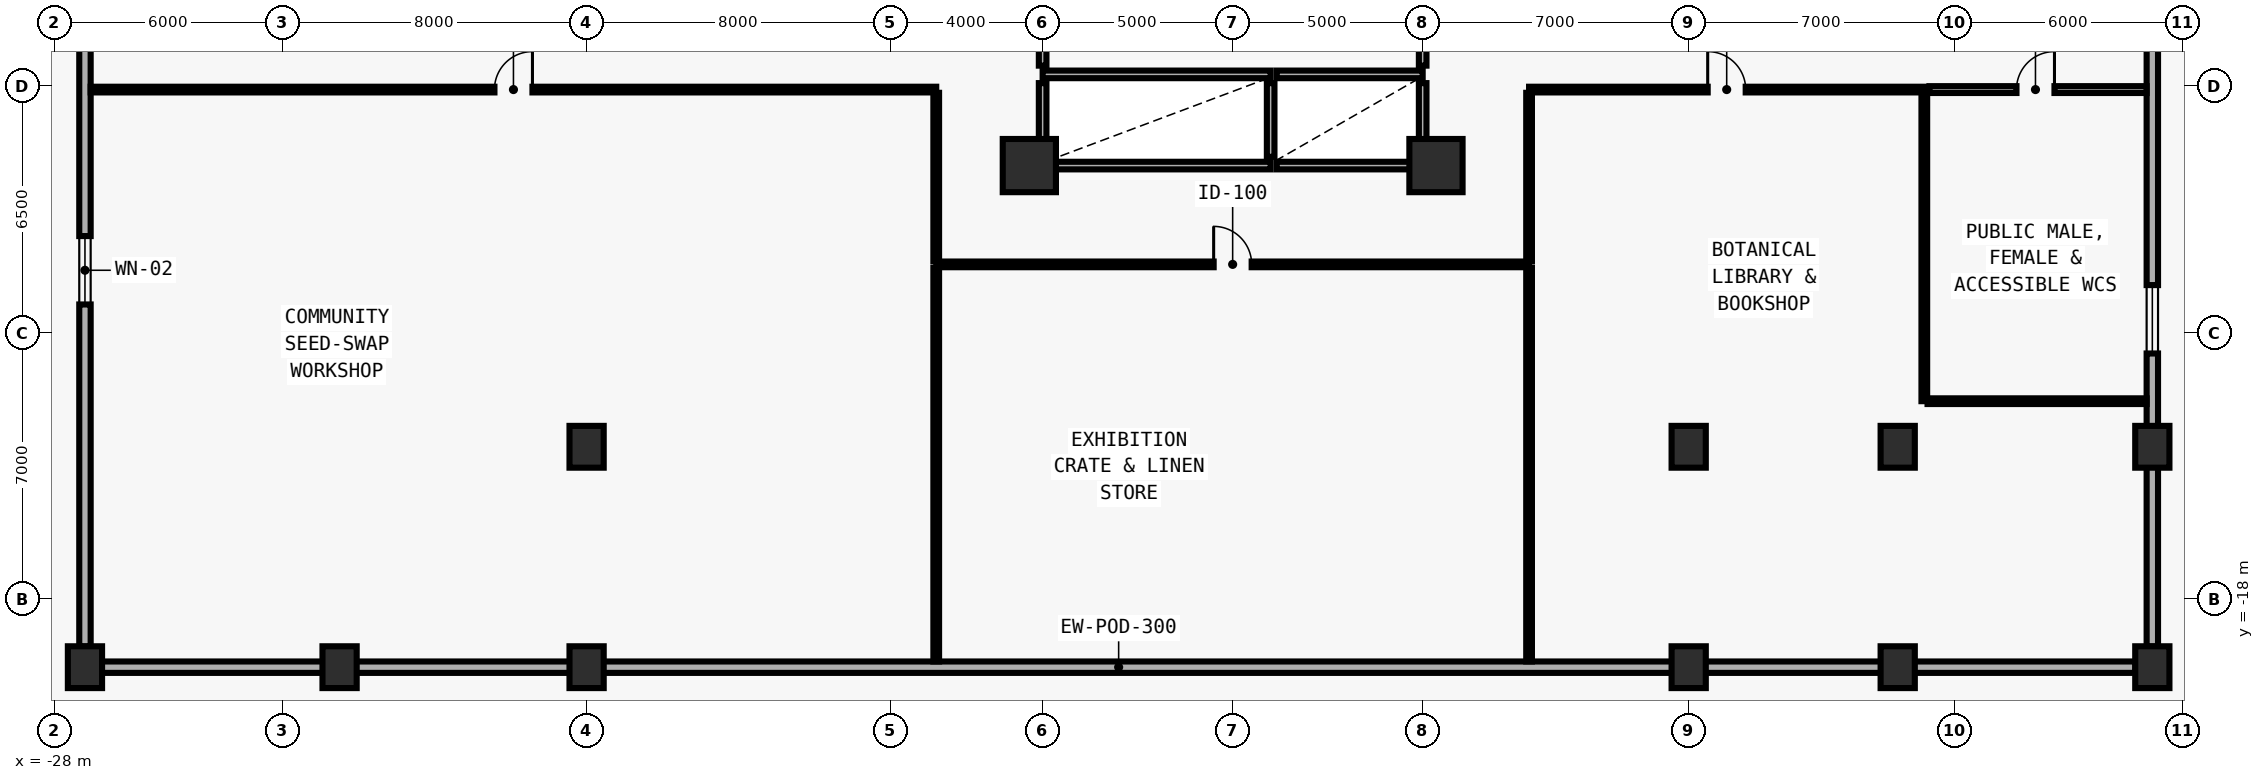
"""IFC4 building model, lengths in metres.
Left out: names, types, materials, properties, quantities, classifications, styles, units other than length and angle.
Written with IfcOpenShell. Run it as: python <this file> out.ifc"""

import sys

from ifc_helpers import new_model, si_unit, direction, frame, frame_2d, origin, origin_2d, place, context, subcontext, project, spatial, rectangle, extrude, element, fill, save


model = new_model("IFC4")
c1 = context("Model", 3, precision=1e-05, world=origin(), true_north=direction((0.0, 1.0)))
c2 = subcontext(c1, "Body", "Model", "MODEL_VIEW")
j1 = project(units=[si_unit("LENGTHUNIT", "METRE"), si_unit("PLANEANGLEUNIT", "RADIAN")], contexts=[c1])
p1 = place(None, origin())
s1 = spatial("IfcSite", under=j1, at=p1, CompositionType="ELEMENT")
p2 = place(p1, origin())
s2 = spatial("IfcBuilding", under=s1, at=p2, CompositionType="ELEMENT")
p3 = place(p2, frame((0.0, 0.0, 13.8)))
s3 = spatial("IfcBuildingStorey", under=s2, at=p3, CompositionType="ELEMENT", Elevation=13.8)
for number, where, z_axis, x_axis in (
    (1, (-2.35, -6.6, 0.0), (0.0, 0.0, 1.0), (1.0, 0.0, 0.0)),
    (2, (8.35, -6.6, 0.0), (0.0, 0.0, 1.0), (1.0, 0.0, 0.0)),
):
    element("IfcColumn", number, at=place(p3, frame(where, z_axis=z_axis, x_axis=x_axis)), inside=s3, PredefinedType="COLUMN", context=c2, shape_type="SweptSolid", body=[
        extrude(rectangle(XDim=1.4, YDim=1.4, at=origin_2d()), origin(), (0.0, 0.0, 1.0), 4.575),
    ])
for number, where, z_axis, x_axis in (
    (3, (-27.2, -19.8, 0.0), (0.0, 0.0, 1.0), (1.0, 0.0, 0.0)),
    (4, (-20.5, -19.8, 0.0), (0.0, 0.0, 1.0), (1.0, 0.0, 0.0)),
    (5, (-14.0, -19.8, 0.0), (0.0, 0.0, 1.0), (1.0, 0.0, 0.0)),
    (6, (-14.0, -14.0, 0.0), (0.0, 0.0, 1.0), (1.0, 0.0, 0.0)),
    (7, (15.0, -19.8, 0.0), (0.0, 0.0, 1.0), (1.0, 0.0, 0.0)),
    (8, (15.0, -14.0, 0.0), (0.0, 0.0, 1.0), (1.0, 0.0, 0.0)),
    (9, (20.5, -19.8, 0.0), (0.0, 0.0, 1.0), (1.0, 0.0, 0.0)),
    (10, (20.5, -14.0, 0.0), (0.0, 0.0, 1.0), (1.0, 0.0, 0.0)),
    (11, (27.2, -19.8, 0.0), (0.0, 0.0, 1.0), (1.0, 0.0, 0.0)),
    (12, (27.2, -14.0, 0.0), (0.0, 0.0, 1.0), (1.0, 0.0, 0.0)),
):
    element("IfcColumn", number, at=place(p3, frame(where, z_axis=z_axis, x_axis=x_axis)), inside=s3, PredefinedType="COLUMN", context=c2, shape_type="SweptSolid", body=[
        extrude(rectangle(XDim=0.9, YDim=1.1, at=origin_2d()), origin(), (0.0, 0.0, 1.0), 4.575),
    ])
p4 = place(p3, frame((-27.2, -19.255, 0.0), z_axis=(0.0, 0.0, 1.0), x_axis=(0.0, 1.0, 0.0)))
e13 = element("IfcWall", 13, at=p4, inside=s3, PredefinedType="SOLIDWALL", context=c2, shape_type="SweptSolid", body=[
    extrude(rectangle(XDim=38.51, YDim=0.3, at=frame_2d((19.255, 0.0))), origin(), (0.0, 0.0, 1.0), 3.35),
])
p5 = place(p4, frame((9.0, 0.0, 0.85)))
e14 = element("IfcOpeningElement", 14, at=p5, cuts=e13, PredefinedType="OPENING", context=c2, shape_type="SweptSolid", body=[
    extrude(rectangle(XDim=1.8, YDim=1.9, at=frame_2d((0.9, 0.95))), frame((0.0, 0.16, 0.0), z_axis=(0.0, -1.0, 0.0), x_axis=(1.0, 0.0, 0.0)), (0.0, 0.0, 1.0), 0.32),
])
p6 = place(p4, frame((16.0, 0.0, 0.85)))
e15 = element("IfcOpeningElement", 15, at=p6, cuts=e13, PredefinedType="OPENING", context=c2, shape_type="SweptSolid", body=[
    extrude(rectangle(XDim=1.8, YDim=1.9, at=frame_2d((0.9, 0.95))), frame((0.0, 0.16, 0.0), z_axis=(0.0, -1.0, 0.0), x_axis=(1.0, 0.0, 0.0)), (0.0, 0.0, 1.0), 0.32),
])
p7 = place(p4, frame((29.0, 0.0, 0.85)))
e16 = element("IfcOpeningElement", 16, at=p7, cuts=e13, PredefinedType="OPENING", context=c2, shape_type="SweptSolid", body=[
    extrude(rectangle(XDim=1.8, YDim=1.9, at=frame_2d((0.9, 0.95))), frame((0.0, 0.16, 0.0), z_axis=(0.0, -1.0, 0.0), x_axis=(1.0, 0.0, 0.0)), (0.0, 0.0, 1.0), 0.32),
])
p8 = place(p3, frame((27.2, 19.255, 0.0), z_axis=(0.0, 0.0, 1.0), x_axis=(0.0, -1.0, 0.0)))
e17 = element("IfcWall", 17, at=p8, inside=s3, PredefinedType="SOLIDWALL", context=c2, shape_type="SweptSolid", body=[
    extrude(rectangle(XDim=38.51, YDim=0.3, at=frame_2d((19.255, 0.0))), origin(), (0.0, 0.0, 1.0), 3.35),
])
p9 = place(p8, frame((9.0, 0.0, 0.85)))
e18 = element("IfcOpeningElement", 18, at=p9, cuts=e17, PredefinedType="OPENING", context=c2, shape_type="SweptSolid", body=[
    extrude(rectangle(XDim=1.8, YDim=1.9, at=frame_2d((0.9, 0.95))), frame((0.0, 0.16, 0.0), z_axis=(0.0, -1.0, 0.0), x_axis=(1.0, 0.0, 0.0)), (0.0, 0.0, 1.0), 0.32),
])
p10 = place(p8, frame((29.0, 0.0, 0.85)))
e19 = element("IfcOpeningElement", 19, at=p10, cuts=e17, PredefinedType="OPENING", context=c2, shape_type="SweptSolid", body=[
    extrude(rectangle(XDim=1.8, YDim=1.9, at=frame_2d((0.9, 0.95))), frame((0.0, 0.16, 0.0), z_axis=(0.0, -1.0, 0.0), x_axis=(1.0, 0.0, 0.0)), (0.0, 0.0, 1.0), 0.32),
])
p11 = place(p3, frame((26.755, -19.8, 0.0), z_axis=(0.0, 0.0, 1.0), x_axis=(-1.0, 0.0, 0.0)))
e20 = element("IfcWall", 20, at=p11, inside=s3, PredefinedType="SOLIDWALL", context=c2, shape_type="SweptSolid", body=[
    extrude(rectangle(XDim=53.51, YDim=0.3, at=frame_2d((26.755, 0.0))), origin(), (0.0, 0.0, 1.0), 3.35),
])
p12 = place(p3, frame((-2.0, -4.2, 0.0), z_axis=(0.0, 0.0, 1.0), x_axis=(1.0, 0.0, 0.0)))
e21 = element("IfcWall", 21, at=p12, inside=s3, PredefinedType="SOLIDWALL", context=c2, shape_type="SweptSolid", body=[
    extrude(rectangle(XDim=6.0, YDim=0.2, at=frame_2d((3.0, 0.0))), origin(), (0.0, 0.0, 1.0), 4.28),
])
p13 = place(p3, frame((-2.0, -6.6, 0.0), z_axis=(0.0, 0.0, 1.0), x_axis=(1.0, 0.0, 0.0)))
e22 = element("IfcWall", 22, at=p13, inside=s3, PredefinedType="SOLIDWALL", context=c2, shape_type="SweptSolid", body=[
    extrude(rectangle(XDim=6.0, YDim=0.2, at=frame_2d((3.0, 0.0))), origin(), (0.0, 0.0, 1.0), 3.362),
])
p14 = place(p3, frame((-2.0, -6.37, 0.0), z_axis=(0.0, 0.0, 1.0), x_axis=(0.0, 1.0, 0.0)))
e23 = element("IfcWall", 23, at=p14, inside=s3, PredefinedType="SOLIDWALL", context=c2, shape_type="SweptSolid", body=[
    extrude(rectangle(XDim=1.94, YDim=0.2, at=frame_2d((0.97, 0.0))), origin(), (0.0, 0.0, 1.0), 3.362),
])
p15 = place(p3, frame((4.16, -4.2, 0.0), z_axis=(0.0, 0.0, 1.0), x_axis=(1.0, 0.0, 0.0)))
e24 = element("IfcWall", 24, at=p15, inside=s3, PredefinedType="SOLIDWALL", context=c2, shape_type="SweptSolid", body=[
    extrude(rectangle(XDim=3.84, YDim=0.2, at=frame_2d((1.92, 0.0))), origin(), (0.0, 0.0, 1.0), 4.28),
])
p16 = place(p3, frame((4.16, -6.6, 0.0), z_axis=(0.0, 0.0, 1.0), x_axis=(1.0, 0.0, 0.0)))
e25 = element("IfcWall", 25, at=p16, inside=s3, PredefinedType="SOLIDWALL", context=c2, shape_type="SweptSolid", body=[
    extrude(rectangle(XDim=3.84, YDim=0.2, at=frame_2d((1.92, 0.0))), origin(), (0.0, 0.0, 1.0), 3.362),
])
p17 = place(p3, frame((4.0, -6.37, 0.0), z_axis=(0.0, 0.0, 1.0), x_axis=(0.0, 1.0, 0.0)))
e26 = element("IfcWall", 26, at=p17, inside=s3, PredefinedType="SOLIDWALL", context=c2, shape_type="SweptSolid", body=[
    extrude(rectangle(XDim=1.94, YDim=0.2, at=frame_2d((0.97, 0.0))), origin(), (0.0, 0.0, 1.0), 4.28),
])
p18 = place(p3, frame((8.0, -6.37, 0.0), z_axis=(0.0, 0.0, 1.0), x_axis=(0.0, 1.0, 0.0)))
e27 = element("IfcWall", 27, at=p18, inside=s3, PredefinedType="SOLIDWALL", context=c2, shape_type="SweptSolid", body=[
    extrude(rectangle(XDim=1.94, YDim=0.2, at=frame_2d((0.97, 0.0))), origin(), (0.0, 0.0, 1.0), 3.362),
])
p19 = place(p3, frame((-2.0, -3.97, 0.0), z_axis=(0.0, 0.0, 1.0), x_axis=(0.0, 1.0, 0.0)))
e28 = element("IfcWall", 28, at=p19, inside=s3, PredefinedType="MOVABLE", context=c2, shape_type="SweptSolid", body=[
    extrude(rectangle(XDim=1.94, YDim=0.2, at=frame_2d((0.97, 0.0))), origin(), (0.0, 0.0, 1.0), 3.362),
])
p20 = place(p19, frame((0.47, 0.0, 0.0)))
e29 = element("IfcOpeningElement", 29, at=p20, cuts=e28, PredefinedType="OPENING", context=c2, shape_type="SweptSolid", body=[
    extrude(rectangle(XDim=1.0, YDim=2.1, at=frame_2d((0.5, 1.05))), frame((0.0, 0.11, 0.0), z_axis=(0.0, -1.0, 0.0), x_axis=(1.0, 0.0, 0.0)), (0.0, 0.0, 1.0), 0.22),
])
p21 = place(p3, frame((8.0, -3.97, 0.0), z_axis=(0.0, 0.0, 1.0), x_axis=(0.0, 1.0, 0.0)))
e30 = element("IfcWall", 30, at=p21, inside=s3, PredefinedType="MOVABLE", context=c2, shape_type="SweptSolid", body=[
    extrude(rectangle(XDim=1.94, YDim=0.2, at=frame_2d((0.97, 0.0))), origin(), (0.0, 0.0, 1.0), 3.362),
])
p22 = place(p21, frame((0.47, 0.0, 0.0)))
e31 = element("IfcOpeningElement", 31, at=p22, cuts=e30, PredefinedType="OPENING", context=c2, shape_type="SweptSolid", body=[
    extrude(rectangle(XDim=1.0, YDim=2.1, at=frame_2d((0.5, 1.05))), frame((0.0, 0.11, 0.0), z_axis=(0.0, -1.0, 0.0), x_axis=(1.0, 0.0, 0.0)), (0.0, 0.0, 1.0), 0.22),
])
p23 = place(p3, frame((-27.05, -4.6, 0.0), z_axis=(0.0, 0.0, 1.0), x_axis=(1.0, 0.0, 0.0)))
e32 = element("IfcWall", 32, at=p23, inside=s3, PredefinedType="PARTITIONING", context=c2, shape_type="SweptSolid", body=[
    extrude(rectangle(XDim=22.25, YDim=0.15, at=frame_2d((11.125, 0.0))), origin(), (0.0, 0.0, 1.0), 4.28),
])
p24 = place(p23, frame((10.625, 0.0, 0.0)))
e33 = element("IfcOpeningElement", 33, at=p24, cuts=e32, PredefinedType="OPENING", context=c2, shape_type="SweptSolid", body=[
    extrude(rectangle(XDim=1.0, YDim=2.1, at=frame_2d((0.5, 1.05))), frame((0.0, 0.085, 0.0), z_axis=(0.0, -1.0, 0.0), x_axis=(1.0, 0.0, 0.0)), (0.0, 0.0, 1.0), 0.17),
])
p25 = place(p3, frame((10.8, -4.6, 0.0), z_axis=(0.0, 0.0, 1.0), x_axis=(1.0, 0.0, 0.0)))
e34 = element("IfcWall", 34, at=p25, inside=s3, PredefinedType="PARTITIONING", context=c2, shape_type="SweptSolid", body=[
    extrude(rectangle(XDim=10.4, YDim=0.15, at=frame_2d((5.2, 0.0))), origin(), (0.0, 0.0, 1.0), 4.28),
])
p26 = place(p25, frame((4.7, 0.0, 0.0)))
e35 = element("IfcOpeningElement", 35, at=p26, cuts=e34, PredefinedType="OPENING", context=c2, shape_type="SweptSolid", body=[
    extrude(rectangle(XDim=1.0, YDim=2.1, at=frame_2d((0.5, 1.05))), frame((0.0, 0.085, 0.0), z_axis=(0.0, -1.0, 0.0), x_axis=(1.0, 0.0, 0.0)), (0.0, 0.0, 1.0), 0.17),
])
p27 = place(p3, frame((21.335, -4.6, 0.0), z_axis=(0.0, 0.0, 1.0), x_axis=(1.0, 0.0, 0.0)))
e36 = element("IfcWall", 36, at=p27, inside=s3, PredefinedType="PLUMBINGWALL", context=c2, shape_type="SweptSolid", body=[
    extrude(rectangle(XDim=5.715, YDim=0.18, at=frame_2d((2.857, 0.0))), origin(), (0.0, 0.0, 1.0), 4.28),
])
p28 = place(p27, frame((2.29, 0.0, 0.0)))
e37 = element("IfcOpeningElement", 37, at=p28, cuts=e36, PredefinedType="OPENING", context=c2, shape_type="SweptSolid", body=[
    extrude(rectangle(XDim=1.0, YDim=2.1, at=frame_2d((0.5, 1.05))), frame((0.0, 0.1, 0.0), z_axis=(0.0, -1.0, 0.0), x_axis=(1.0, 0.0, 0.0)), (0.0, 0.0, 1.0), 0.2),
])
p29 = place(p3, frame((-4.8, -9.2, 0.0), z_axis=(0.0, 0.0, 1.0), x_axis=(1.0, 0.0, 0.0)))
e38 = element("IfcWall", 38, at=p29, inside=s3, PredefinedType="PARTITIONING", context=c2, shape_type="SweptSolid", body=[
    extrude(rectangle(XDim=15.6, YDim=0.15, at=frame_2d((7.8, 0.0))), origin(), (0.0, 0.0, 1.0), 4.28),
])
p30 = place(p29, frame((7.3, 0.0, 0.0)))
e39 = element("IfcOpeningElement", 39, at=p30, cuts=e38, PredefinedType="OPENING", context=c2, shape_type="SweptSolid", body=[
    extrude(rectangle(XDim=1.0, YDim=2.1, at=frame_2d((0.5, 1.05))), frame((0.0, 0.085, 0.0), z_axis=(0.0, -1.0, 0.0), x_axis=(1.0, 0.0, 0.0)), (0.0, 0.0, 1.0), 0.17),
])
for number, where, z_axis, x_axis in (
    (40, (-4.8, -4.685, 0.0), (0.0, 0.0, 1.0), (0.0, -1.0, 0.0)),
    (41, (10.8, -9.115, 0.0), (0.0, 0.0, 1.0), (0.0, 1.0, 0.0)),
):
    element("IfcWall", number, at=place(p3, frame(where, z_axis=z_axis, x_axis=x_axis)), inside=s3, PredefinedType="PARTITIONING", context=c2, shape_type="SweptSolid", body=[
        extrude(rectangle(XDim=4.43, YDim=0.15, at=frame_2d((2.215, 0.0))), origin(), (0.0, 0.0, 1.0), 4.28),
    ])
p31 = place(p3, frame((-4.8, -9.285, 0.0), z_axis=(0.0, 0.0, 1.0), x_axis=(0.0, -1.0, 0.0)))
e42 = element("IfcWall", 42, at=p31, inside=s3, PredefinedType="PARTITIONING", context=c2, shape_type="SweptSolid", body=[
    extrude(rectangle(XDim=10.365, YDim=0.15, at=frame_2d((5.183, 0.0))), origin(), (0.0, 0.0, 1.0), 4.28),
])
p32 = place(p3, frame((21.2, -4.685, 0.0), z_axis=(0.0, 0.0, 1.0), x_axis=(0.0, -1.0, 0.0)))
e43 = element("IfcWall", 43, at=p32, inside=s3, PredefinedType="PARTITIONING", context=c2, shape_type="SweptSolid", body=[
    extrude(rectangle(XDim=8.115, YDim=0.15, at=frame_2d((4.058, 0.0))), origin(), (0.0, 0.0, 1.0), 3.562),
])
p33 = place(p3, frame((21.285, -12.8, 0.0), z_axis=(0.0, 0.0, 1.0), x_axis=(1.0, 0.0, 0.0)))
e44 = element("IfcWall", 44, at=p33, inside=s3, PredefinedType="PARTITIONING", context=c2, shape_type="SweptSolid", body=[
    extrude(rectangle(XDim=5.765, YDim=0.15, at=frame_2d((2.883, 0.0))), origin(), (0.0, 0.0, 1.0), 4.28),
])
p34 = place(p3, frame((10.8, -19.65, 0.0), z_axis=(0.0, 0.0, 1.0), x_axis=(0.0, 1.0, 0.0)))
e45 = element("IfcWall", 45, at=p34, inside=s3, PredefinedType="PARTITIONING", context=c2, shape_type="SweptSolid", body=[
    extrude(rectangle(XDim=10.365, YDim=0.15, at=frame_2d((5.183, 0.0))), origin(), (0.0, 0.0, 1.0), 4.28),
])
p35 = place(p5, origin())
e46 = element("IfcWindow", 46, at=p35, inside=s3, PartitioningType="SINGLE_PANEL", PredefinedType="WINDOW", context=c2, shape_type="SweptSolid", body=[
    extrude(rectangle(XDim=1.8, YDim=1.9, at=frame_2d((0.9, 0.95))), frame((0.0, 0.03, 0.0), z_axis=(0.0, -1.0, 0.0), x_axis=(1.0, 0.0, 0.0)), (0.0, 0.0, 1.0), 0.06),
])
fill(e14, e46)
p36 = place(p10, origin())
e47 = element("IfcWindow", 47, at=p36, inside=s3, PartitioningType="SINGLE_PANEL", PredefinedType="WINDOW", context=c2, shape_type="SweptSolid", body=[
    extrude(rectangle(XDim=1.8, YDim=1.9, at=frame_2d((0.9, 0.95))), frame((0.0, 0.03, 0.0), z_axis=(0.0, -1.0, 0.0), x_axis=(1.0, 0.0, 0.0)), (0.0, 0.0, 1.0), 0.06),
])
fill(e19, e47)
p37 = place(p24, origin())
e48 = element("IfcDoor", 48, at=p37, inside=s3, OperationType="SINGLE_SWING_RIGHT", PredefinedType="DOOR", context=c2, shape_type="SweptSolid", body=[
    extrude(rectangle(XDim=1.0, YDim=2.1, at=frame_2d((0.5, 1.05))), frame((0.0, 0.025, 0.0), z_axis=(0.0, -1.0, 0.0), x_axis=(1.0, 0.0, 0.0)), (0.0, 0.0, 1.0), 0.05),
])
fill(e33, e48)
p38 = place(p26, origin())
e49 = element("IfcDoor", 49, at=p38, inside=s3, OperationType="SINGLE_SWING_LEFT", PredefinedType="DOOR", context=c2, shape_type="SweptSolid", body=[
    extrude(rectangle(XDim=1.0, YDim=2.1, at=frame_2d((0.5, 1.05))), frame((0.0, 0.025, 0.0), z_axis=(0.0, -1.0, 0.0), x_axis=(1.0, 0.0, 0.0)), (0.0, 0.0, 1.0), 0.05),
])
fill(e35, e49)
p39 = place(p28, origin())
e50 = element("IfcDoor", 50, at=p39, inside=s3, OperationType="SINGLE_SWING_RIGHT", PredefinedType="DOOR", context=c2, shape_type="SweptSolid", body=[
    extrude(rectangle(XDim=1.0, YDim=2.1, at=frame_2d((0.5, 1.05))), frame((0.0, 0.025, 0.0), z_axis=(0.0, -1.0, 0.0), x_axis=(1.0, 0.0, 0.0)), (0.0, 0.0, 1.0), 0.05),
])
fill(e37, e50)
p40 = place(p30, origin())
e51 = element("IfcDoor", 51, at=p40, inside=s3, OperationType="SINGLE_SWING_LEFT", PredefinedType="DOOR", context=c2, shape_type="SweptSolid", body=[
    extrude(rectangle(XDim=1.0, YDim=2.1, at=frame_2d((0.5, 1.05))), frame((0.0, 0.025, 0.0), z_axis=(0.0, -1.0, 0.0), x_axis=(1.0, 0.0, 0.0)), (0.0, 0.0, 1.0), 0.05),
])
fill(e39, e51)
save(model, sys.argv[1])
